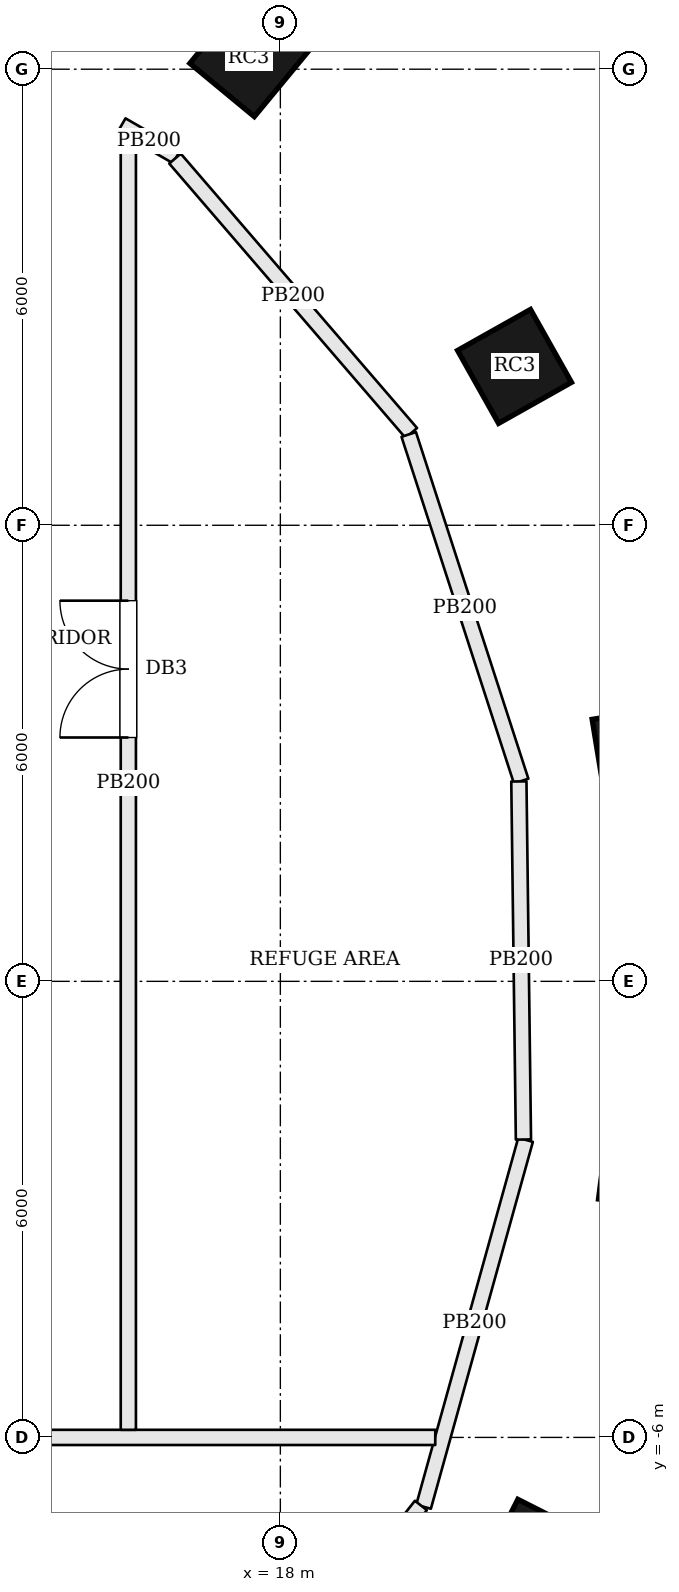
"""IFC4 building model, lengths in metres.
Left out: names, types, materials, properties, quantities, classifications, styles, units other than length and angle.
Written with IfcOpenShell. Run it as: python <this file> out.ifc"""

import sys

from ifc_helpers import new_model, si_unit, direction, frame, frame_2d, origin, origin_2d, place, context, subcontext, project, spatial, rectangle, extrude, element, fill, save


model = new_model("IFC4")
c1 = context("Model", 3, precision=1e-05, world=origin(), true_north=direction((0.0, 1.0)))
c2 = subcontext(c1, "Body", "Model", "MODEL_VIEW")
j1 = project(units=[si_unit("LENGTHUNIT", "METRE"), si_unit("PLANEANGLEUNIT", "RADIAN")], contexts=[c1])
p1 = place(None, origin())
s1 = spatial("IfcSite", under=j1, at=p1, CompositionType="ELEMENT")
p2 = place(p1, origin())
s2 = spatial("IfcBuilding", under=s1, at=p2, CompositionType="ELEMENT")
p3 = place(p2, frame((0.0, 0.0, 150.0)))
s3 = spatial("IfcBuildingStorey", under=s2, at=p3, CompositionType="ELEMENT", Elevation=150.0)
for number, where, z_axis, x_axis in (
    (1, (22.734, 2.993, 0.0), (0.0, 0.0, 1.0), (-0.162, 0.987, 0.0)),
    (2, (21.081, 8.09, 0.0), (0.0, 0.0, 1.0), (-0.49, 0.872, 0.0)),
    (3, (17.584, 12.151, 0.0), (0.0, 0.0, 1.0), (-0.771, 0.637, 0.0)),
    (4, (21.367, -7.554, 0.0), (0.0, 0.0, 1.0), (0.452, 0.892, 0.0)),
    (5, (22.802, -2.389, 0.0), (0.0, 0.0, 1.0), (0.129, 0.992, 0.0)),
):
    element("IfcColumn", number, at=place(p3, frame(where, z_axis=z_axis, x_axis=x_axis)), inside=s3, PredefinedType="COLUMN", context=c2, shape_type="SweptSolid", body=[
        extrude(rectangle(XDim=1.1, YDim=1.1, at=origin_2d()), origin(), (0.0, 0.0, 1.0), 3.9),
    ])
p4 = place(p3, frame((23.849, 12.08, 0.0), z_axis=(0.0, 0.0, 1.0), x_axis=(-0.690057851873, 0.723754213161, 0.0)))
e6 = element("IfcWall", 6, at=p4, inside=s3, PredefinedType="SOLIDWALL", context=c2, shape_type="SweptSolid", body=[
    extrude(rectangle(XDim=4.253, YDim=0.45, at=frame_2d((2.126, 0.0))), origin(), (0.0, 0.0, 1.0), 3.7),
])
p5 = place(p4, frame((1.076, 0.0, 0.9)))
e7 = element("IfcOpeningElement", 7, at=p5, cuts=e6, PredefinedType="OPENING", context=c2, shape_type="SweptSolid", body=[
    extrude(rectangle(XDim=2.1, YDim=2.3, at=frame_2d((1.05, 1.15))), frame((0.0, 0.235, 0.0), z_axis=(0.0, -1.0, 0.0), x_axis=(1.0, 0.0, 0.0)), (0.0, 0.0, 1.0), 0.47),
])
p6 = place(p3, frame((21.226, -2.085, 0.0), z_axis=(0.0, 0.0, 1.0), x_axis=(-0.267859993319, -0.963457847536, 0.0)))
e8 = element("IfcWall", 8, at=p6, inside=s3, PredefinedType="PARTITIONING", context=c2, shape_type="SweptSolid", body=[
    extrude(rectangle(XDim=5.01, YDim=0.2, at=frame_2d((2.505, 0.0))), origin(), (0.0, 0.0, 1.0), 3.7),
])
p7 = place(p3, frame((19.849, -6.895, 0.0), z_axis=(0.0, 0.0, 1.0), x_axis=(-0.618811760178, -0.785539308669, 0.0)))
e9 = element("IfcWall", 9, at=p7, inside=s3, PredefinedType="PARTITIONING", context=c2, shape_type="SweptSolid", body=[
    extrude(rectangle(XDim=4.756, YDim=0.2, at=frame_2d((2.378, 0.0))), origin(), (0.0, 0.0, 1.0), 3.7),
])
p8 = place(p3, frame((-19.977, -6.0, 0.0), z_axis=(0.0, 0.0, 1.0), x_axis=(1.0, 0.0, 0.0)))
e10 = element("IfcWall", 10, at=p8, inside=s3, PredefinedType="PARTITIONING", context=c2, shape_type="SweptSolid", body=[
    extrude(rectangle(XDim=40.015, YDim=0.2, at=frame_2d((20.008, 0.0))), origin(), (0.0, 0.0, 1.0), 3.7),
])
p9 = place(p8, frame((19.077, 0.0, 0.0)))
e11 = element("IfcOpeningElement", 11, at=p9, cuts=e10, PredefinedType="OPENING", context=c2, shape_type="SweptSolid", body=[
    extrude(rectangle(XDim=1.8, YDim=2.1, at=frame_2d((0.9, 1.05))), frame((0.0, 0.11, 0.0), z_axis=(0.0, -1.0, 0.0), x_axis=(1.0, 0.0, 0.0)), (0.0, 0.0, 1.0), 0.22),
])
p10 = place(p3, frame((15.913, 11.267, 0.0), z_axis=(0.0, 0.0, 1.0), x_axis=(0.866219676164, -0.4996633593, 0.0)))
e12 = element("IfcWall", 12, at=p10, inside=s3, PredefinedType="PARTITIONING", context=c2, shape_type="SweptSolid", body=[
    extrude(rectangle(XDim=0.834, YDim=0.2, at=frame_2d((0.417, 0.0))), origin(), (0.0, 0.0, 1.0), 3.7),
])
p11 = place(p3, frame((16.614, 10.824, 0.0), z_axis=(0.0, 0.0, 1.0), x_axis=(0.652570543166, -0.757727976382, 0.0)))
e13 = element("IfcWall", 13, at=p11, inside=s3, PredefinedType="PARTITIONING", context=c2, shape_type="SweptSolid", body=[
    extrude(rectangle(XDim=4.764, YDim=0.2, at=frame_2d((2.382, 0.0))), origin(), (0.0, 0.0, 1.0), 3.7),
])
p12 = place(p3, frame((19.689, 7.195, 0.0), z_axis=(0.0, 0.0, 1.0), x_axis=(0.308517152125, -0.951218779695, 0.0)))
e14 = element("IfcWall", 14, at=p12, inside=s3, PredefinedType="PARTITIONING", context=c2, shape_type="SweptSolid", body=[
    extrude(rectangle(XDim=4.794, YDim=0.2, at=frame_2d((2.397, 0.0))), origin(), (0.0, 0.0, 1.0), 3.7),
])
p13 = place(p3, frame((21.138, 2.63, 0.0), z_axis=(0.0, 0.0, 1.0), x_axis=(0.012747720312, -0.999918744512, 0.0)))
e15 = element("IfcWall", 15, at=p13, inside=s3, PredefinedType="PARTITIONING", context=c2, shape_type="SweptSolid", body=[
    extrude(rectangle(XDim=4.711, YDim=0.2, at=frame_2d((2.356, 0.0))), origin(), (0.0, 0.0, 1.0), 3.7),
])
p14 = place(p3, frame((16.0, -5.9, 0.0), z_axis=(0.0, 0.0, 1.0), x_axis=(0.0, 1.0, 0.0)))
e16 = element("IfcWall", 16, at=p14, inside=s3, PredefinedType="PARTITIONING", context=c2, shape_type="SweptSolid", body=[
    extrude(rectangle(XDim=17.017, YDim=0.2, at=frame_2d((8.508, 0.0))), origin(), (0.0, 0.0, 1.0), 3.7),
])
p15 = place(p14, frame((9.108, 0.0, 0.0)))
e17 = element("IfcOpeningElement", 17, at=p15, cuts=e16, PredefinedType="OPENING", context=c2, shape_type="SweptSolid", body=[
    extrude(rectangle(XDim=1.8, YDim=2.1, at=frame_2d((0.9, 1.05))), frame((0.0, 0.11, 0.0), z_axis=(0.0, -1.0, 0.0), x_axis=(1.0, 0.0, 0.0)), (0.0, 0.0, 1.0), 0.22),
])
p16 = place(p15, origin())
e18 = element("IfcDoor", 18, at=p16, inside=s3, OperationType="DOUBLE_DOOR_SINGLE_SWING", PredefinedType="DOOR", context=c2, shape_type="SweptSolid", body=[
    extrude(rectangle(XDim=1.8, YDim=2.1, at=frame_2d((0.9, 1.05))), frame((0.0, 0.025, 0.0), z_axis=(0.0, -1.0, 0.0), x_axis=(1.0, 0.0, 0.0)), (0.0, 0.0, 1.0), 0.05),
])
fill(e17, e18)
save(model, sys.argv[1])
